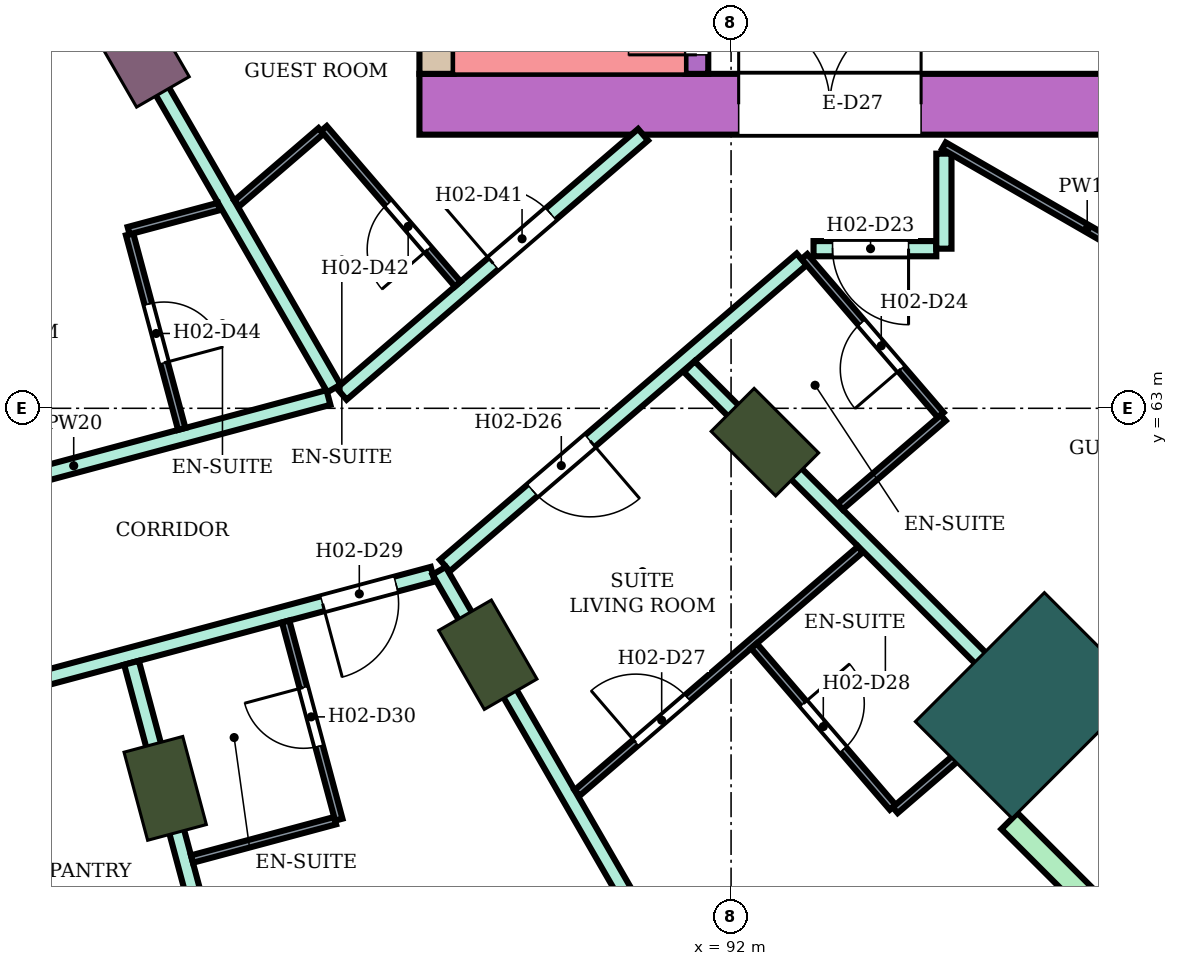
"""IFC4 building model, lengths in metres.
Left out: names, types, materials, properties, quantities, classifications, styles, units other than length and angle.
Written with IfcOpenShell. Run it as: python <this file> out.ifc"""

import sys

from ifc_helpers import new_model, si_unit, direction, frame, frame_2d, origin, origin_2d, place, context, subcontext, project, spatial, rectangle, extrude, element, fill, save


model = new_model("IFC4")
c1 = context("Model", 3, precision=1e-05, world=origin(), true_north=direction((0.0, 1.0)))
c2 = subcontext(c1, "Body", "Model", "MODEL_VIEW")
j1 = project(units=[si_unit("LENGTHUNIT", "METRE"), si_unit("PLANEANGLEUNIT", "RADIAN")], contexts=[c1])
p1 = place(None, origin())
s1 = spatial("IfcSite", under=j1, at=p1, CompositionType="ELEMENT")
p2 = place(p1, origin())
s2 = spatial("IfcBuilding", under=s1, at=p2, CompositionType="ELEMENT")
p3 = place(p2, frame((0.0, 0.0, 47.8)))
s3 = spatial("IfcBuildingStorey", under=s2, at=p3, CompositionType="ELEMENT", Elevation=47.8)
for number, where, z_axis, x_axis in (
    (1, (84.555, 58.0, 0.0), (0.0, 0.0, 1.0), (0.259, -0.966, 0.0)),
    (2, (88.8, 59.758, 0.0), (0.0, 0.0, 1.0), (0.5, -0.866, 0.0)),
    (3, (92.445, 62.555, 0.0), (0.0, 0.0, 1.0), (0.707, -0.707, 0.0)),
):
    element("IfcColumn", number, at=place(p3, frame(where, z_axis=z_axis, x_axis=x_axis)), inside=s3, PredefinedType="COLUMN", context=c2, shape_type="SweptSolid", body=[
        extrude(rectangle(XDim=1.2, YDim=0.8, at=origin_2d()), origin(), (0.0, 0.0, 1.0), 3.8),
    ])
p4 = place(p3, frame((84.3, 67.552, 0.0), z_axis=(0.0, 0.0, 1.0), x_axis=(0.5, -0.866025403784, 0.0)))
e4 = element("IfcColumn", 4, at=p4, inside=s3, PredefinedType="COLUMN", context=c2, shape_type="SweptSolid", body=[
    extrude(rectangle(XDim=0.9, YDim=0.8, at=origin_2d()), origin(), (0.0, 0.0, 1.0), 3.8),
])
p5 = place(p3, frame((95.91, 59.09, 0.0), z_axis=(0.0, 0.0, 1.0), x_axis=(0.707106781187, -0.707106781187, 0.0)))
e5 = element("IfcColumn", 5, at=p5, inside=s3, PredefinedType="COLUMN", context=c2, shape_type="SweptSolid", body=[
    extrude(rectangle(XDim=1.8, YDim=2.4, at=origin_2d()), origin(), (0.0, 0.0, 1.0), 3.8),
])
p6 = place(p3, frame((87.9, 67.0, 0.0), z_axis=(0.0, 0.0, 1.0), x_axis=(1.0, 0.0, 0.0)))
e6 = element("IfcWall", 6, at=p6, inside=s3, PredefinedType="SHEAR", context=c2, shape_type="SweptSolid", body=[
    extrude(rectangle(XDim=14.7, YDim=0.8, at=frame_2d((7.35, 0.0))), origin(), (0.0, 0.0, 1.0), 3.48),
])
p7 = place(p6, frame((4.2, 0.0, 0.0)))
e7 = element("IfcOpeningElement", 7, at=p7, cuts=e6, PredefinedType="OPENING", context=c2, shape_type="SweptSolid", body=[
    extrude(rectangle(XDim=2.4, YDim=2.4, at=frame_2d((1.2, 1.2))), frame((0.0, 0.41, 0.0), z_axis=(0.0, -1.0, 0.0), x_axis=(1.0, 0.0, 0.0)), (0.0, 0.0, 1.0), 0.82),
])
p8 = place(p3, frame((88.125, 67.4, 0.0), z_axis=(0.0, 0.0, 1.0), x_axis=(0.0, 1.0, 0.0)))
e8 = element("IfcWall", 8, at=p8, inside=s3, PredefinedType="SHEAR", context=c2, shape_type="SweptSolid", body=[
    extrude(rectangle(XDim=7.6, YDim=0.45, at=frame_2d((3.8, 0.0))), origin(), (0.0, 0.0, 1.0), 3.48),
])
p9 = place(p3, frame((91.55, 67.4, 0.0), z_axis=(0.0, 0.0, 1.0), x_axis=(0.0, 1.0, 0.0)))
e9 = element("IfcWall", 9, at=p9, inside=s3, PredefinedType="SHEAR", context=c2, shape_type="SweptSolid", body=[
    extrude(rectangle(XDim=7.6, YDim=0.3, at=frame_2d((3.8, 0.0))), origin(), (0.0, 0.0, 1.0), 3.48),
])
p10 = place(p9, frame((0.25, 0.0, 0.0)))
e10 = element("IfcOpeningElement", 10, at=p10, cuts=e9, PredefinedType="OPENING", context=c2, shape_type="SweptSolid", body=[
    extrude(rectangle(XDim=0.9, YDim=2.1, at=frame_2d((0.45, 1.05))), frame((0.0, 0.16, 0.0), z_axis=(0.0, -1.0, 0.0), x_axis=(1.0, 0.0, 0.0)), (0.0, 0.0, 1.0), 0.32),
])
p11 = place(p3, frame((95.662, 57.57, 0.0), z_axis=(0.0, 0.0, 1.0), x_axis=(0.707106781187, -0.707106781187, 0.0)))
e11 = element("IfcWall", 11, at=p11, inside=s3, PredefinedType="NOTDEFINED", context=c2, shape_type="SweptSolid", body=[
    extrude(rectangle(XDim=2.416, YDim=0.3, at=frame_2d((1.208, 0.0))), origin(), (0.0, 0.0, 1.0), 3.8),
])
p12 = place(p3, frame((80.0, 67.396, 0.0), z_axis=(0.0, 0.0, 1.0), x_axis=(0.965933654434, 0.258789828301, 0.0)))
e12 = element("IfcWall", 12, at=p12, inside=s3, PredefinedType="NOTDEFINED", context=c2, shape_type="SweptSolid", body=[
    extrude(rectangle(XDim=3.936, YDim=0.2, at=frame_2d((1.968, 0.0))), origin(), (0.0, 0.0, 1.0), 3.8),
])
p13 = place(p12, frame((0.468, 0.0, 0.9)))
e13 = element("IfcOpeningElement", 13, at=p13, cuts=e12, PredefinedType="OPENING", context=c2, shape_type="SweptSolid", body=[
    extrude(rectangle(XDim=3.0, YDim=2.3, at=frame_2d((1.5, 1.15))), frame((0.0, 0.11, 0.0), z_axis=(0.0, -1.0, 0.0), x_axis=(1.0, 0.0, 0.0)), (0.0, 0.0, 1.0), 0.22),
])
p14 = place(p3, frame((80.0, 58.655, 0.0), z_axis=(0.0, 0.0, 1.0), x_axis=(0.965967338894, 0.258664068224, 0.0)))
e14 = element("IfcWall", 14, at=p14, inside=s3, PredefinedType="PARTITIONING", context=c2, shape_type="SweptSolid", body=[
    extrude(rectangle(XDim=8.36, YDim=0.2, at=frame_2d((4.18, 0.0))), origin(), (0.0, 0.0, 1.0), 3.35),
])
p15 = place(p14, frame((6.86, 0.0, 0.0)))
e15 = element("IfcOpeningElement", 15, at=p15, cuts=e14, PredefinedType="OPENING", context=c2, shape_type="SweptSolid", body=[
    extrude(rectangle(XDim=1.0, YDim=2.1, at=frame_2d((0.5, 1.05))), frame((0.0, 0.11, 0.0), z_axis=(0.0, -1.0, 0.0), x_axis=(1.0, 0.0, 0.0)), (0.0, 0.0, 1.0), 0.22),
])
p16 = place(p14, frame((1.675, 0.0, 0.0)))
e16 = element("IfcOpeningElement", 16, at=p16, cuts=e14, PredefinedType="OPENING", context=c2, shape_type="SweptSolid", body=[
    extrude(rectangle(XDim=0.9, YDim=2.1, at=frame_2d((0.45, 1.05))), frame((0.0, 0.11, 0.0), z_axis=(0.0, -1.0, 0.0), x_axis=(1.0, 0.0, 0.0)), (0.0, 0.0, 1.0), 0.22),
])
p17 = place(p3, frame((80.0, 61.346, 0.0), z_axis=(0.0, 0.0, 1.0), x_axis=(0.965924181808, 0.258825182312, 0.0)))
e17 = element("IfcWall", 17, at=p17, inside=s3, PredefinedType="PARTITIONING", context=c2, shape_type="SweptSolid", body=[
    extrude(rectangle(XDim=6.94, YDim=0.2, at=frame_2d((3.47, 0.0))), origin(), (0.0, 0.0, 1.0), 3.35),
])
p18 = place(p17, frame((0.55, 0.0, 0.0)))
e18 = element("IfcOpeningElement", 18, at=p18, cuts=e17, PredefinedType="OPENING", context=c2, shape_type="SweptSolid", body=[
    extrude(rectangle(XDim=1.0, YDim=2.1, at=frame_2d((0.5, 1.05))), frame((0.0, 0.11, 0.0), z_axis=(0.0, -1.0, 0.0), x_axis=(1.0, 0.0, 0.0)), (0.0, 0.0, 1.0), 0.22),
])
p19 = place(p3, frame((83.848, 68.332, 0.0), z_axis=(0.0, 0.0, 1.0), x_axis=(0.499919778085, -0.866071714975, 0.0)))
e19 = element("IfcWall", 19, at=p19, inside=s3, PredefinedType="PARTITIONING", context=c2, shape_type="SweptSolid", body=[
    extrude(rectangle(XDim=5.855, YDim=0.2, at=frame_2d((2.927, 0.0))), origin(), (0.0, 0.0, 1.0), 3.35),
])
p20 = place(p3, frame((84.112, 59.652, 0.0), z_axis=(0.0, 0.0, 1.0), x_axis=(0.258791091927, -0.965933315886, 0.0)))
e20 = element("IfcWall", 20, at=p20, inside=s3, PredefinedType="PARTITIONING", context=c2, shape_type="SweptSolid", body=[
    extrude(rectangle(XDim=9.909, YDim=0.2, at=frame_2d((4.955, 0.0))), origin(), (0.0, 0.0, 1.0), 3.35),
])
p21 = place(p3, frame((86.877, 63.189, 0.0), z_axis=(0.0, 0.0, 1.0), x_axis=(0.758164888471, 0.652062881853, 0.0)))
e21 = element("IfcWall", 21, at=p21, inside=s3, PredefinedType="PARTITIONING", context=c2, shape_type="SweptSolid", body=[
    extrude(rectangle(XDim=5.23, YDim=0.2, at=frame_2d((2.615, 0.0))), origin(), (0.0, 0.0, 1.0), 3.35),
])
p22 = place(p21, frame((2.63, 0.0, 0.0)))
e22 = element("IfcOpeningElement", 22, at=p22, cuts=e21, PredefinedType="OPENING", context=c2, shape_type="SweptSolid", body=[
    extrude(rectangle(XDim=1.0, YDim=2.1, at=frame_2d((0.5, 1.05))), frame((0.0, 0.11, 0.0), z_axis=(0.0, -1.0, 0.0), x_axis=(1.0, 0.0, 0.0)), (0.0, 0.0, 1.0), 0.22),
])
p23 = place(p3, frame((88.235, 60.931, 0.0), z_axis=(0.0, 0.0, 1.0), x_axis=(0.758799498714, 0.651324282329, 0.0)))
e23 = element("IfcWall", 23, at=p23, inside=s3, PredefinedType="PARTITIONING", context=c2, shape_type="SweptSolid", body=[
    extrude(rectangle(XDim=6.186, YDim=0.2, at=frame_2d((3.093, 0.0))), origin(), (0.0, 0.0, 1.0), 3.35),
])
p24 = place(p23, frame((1.519, 0.0, 0.0)))
e24 = element("IfcOpeningElement", 24, at=p24, cuts=e23, PredefinedType="OPENING", context=c2, shape_type="SweptSolid", body=[
    extrude(rectangle(XDim=1.0, YDim=2.1, at=frame_2d((0.5, 1.05))), frame((0.0, 0.11, 0.0), z_axis=(0.0, -1.0, 0.0), x_axis=(1.0, 0.0, 0.0)), (0.0, 0.0, 1.0), 0.22),
])
p25 = place(p3, frame((88.159, 60.863, 0.0), z_axis=(0.0, 0.0, 1.0), x_axis=(0.499897184548, -0.866084756177, 0.0)))
e25 = element("IfcWall", 25, at=p25, inside=s3, PredefinedType="PARTITIONING", context=c2, shape_type="SweptSolid", body=[
    extrude(rectangle(XDim=9.475, YDim=0.2, at=frame_2d((4.737, 0.0))), origin(), (0.0, 0.0, 1.0), 3.35),
])
p26 = place(p3, frame((91.449, 63.548, 0.0), z_axis=(0.0, 0.0, 1.0), x_axis=(0.706984810649, -0.707228730688, 0.0)))
e26 = element("IfcWall", 26, at=p26, inside=s3, PredefinedType="PARTITIONING", context=c2, shape_type="SweptSolid", body=[
    extrude(rectangle(XDim=7.006, YDim=0.2, at=frame_2d((3.503, 0.0))), origin(), (0.0, 0.0, 1.0), 3.35),
])
p27 = place(p3, frame((93.085, 65.1, 0.0), z_axis=(0.0, 0.0, 1.0), x_axis=(1.0, 0.0, 0.0)))
e27 = element("IfcWall", 27, at=p27, inside=s3, PredefinedType="PARTITIONING", context=c2, shape_type="SweptSolid", body=[
    extrude(rectangle(XDim=1.615, YDim=0.2, at=frame_2d((0.808, 0.0))), origin(), (0.0, 0.0, 1.0), 3.35),
])
p28 = place(p27, frame((0.25, 0.0, 0.0)))
e28 = element("IfcOpeningElement", 28, at=p28, cuts=e27, PredefinedType="OPENING", context=c2, shape_type="SweptSolid", body=[
    extrude(rectangle(XDim=1.0, YDim=2.1, at=frame_2d((0.5, 1.05))), frame((0.0, 0.11, 0.0), z_axis=(0.0, -1.0, 0.0), x_axis=(1.0, 0.0, 0.0)), (0.0, 0.0, 1.0), 0.22),
])
p29 = place(p3, frame((94.8, 65.1, 0.0), z_axis=(0.0, 0.0, 1.0), x_axis=(0.0, 1.0, 0.0)))
e29 = element("IfcWall", 29, at=p29, inside=s3, PredefinedType="PARTITIONING", context=c2, shape_type="SweptSolid", body=[
    extrude(rectangle(XDim=1.25, YDim=0.2, at=frame_2d((0.625, 0.0))), origin(), (0.0, 0.0, 1.0), 3.35),
])
p30 = place(p3, frame((84.087, 65.289, 0.0), z_axis=(0.0, 0.0, 1.0), x_axis=(0.258929459649, -0.965896234037, 0.0)))
e30 = element("IfcWall", 30, at=p30, inside=s3, PredefinedType="PARTITIONING", context=c2, shape_type="SweptSolid", body=[
    extrude(rectangle(XDim=2.65, YDim=0.1, at=frame_2d((1.325, 0.0))), origin(), (0.0, 0.0, 1.0), 3.35),
])
p31 = place(p30, frame((0.95, 0.0, 0.0)))
e31 = element("IfcOpeningElement", 31, at=p31, cuts=e30, PredefinedType="OPENING", context=c2, shape_type="SweptSolid", body=[
    extrude(rectangle(XDim=0.8, YDim=2.1, at=frame_2d((0.4, 1.05))), frame((0.0, 0.06, 0.0), z_axis=(0.0, -1.0, 0.0), x_axis=(1.0, 0.0, 0.0)), (0.0, 0.0, 1.0), 0.12),
])
p32 = place(p3, frame((84.074, 65.337, 0.0), z_axis=(0.0, 0.0, 1.0), x_axis=(0.965914351064, 0.258861867428, 0.0)))
e32 = element("IfcWall", 32, at=p32, inside=s3, PredefinedType="PARTITIONING", context=c2, shape_type="SweptSolid", body=[
    extrude(rectangle(XDim=1.229, YDim=0.1, at=frame_2d((0.615, 0.0))), origin(), (0.0, 0.0, 1.0), 3.35),
])
p33 = place(p3, frame((84.908, 57.07, 0.0), z_axis=(0.0, 0.0, 1.0), x_axis=(0.965853538138, 0.25908867761, 0.0)))
e33 = element("IfcWall", 33, at=p33, inside=s3, PredefinedType="PARTITIONING", context=c2, shape_type="SweptSolid", body=[
    extrude(rectangle(XDim=1.95, YDim=0.1, at=frame_2d((0.975, 0.0))), origin(), (0.0, 0.0, 1.0), 3.35),
])
p34 = place(p3, frame((85.497, 65.696, 0.0), z_axis=(0.0, 0.0, 1.0), x_axis=(0.75817032582, 0.652056559698, 0.0)))
e34 = element("IfcWall", 34, at=p34, inside=s3, PredefinedType="PARTITIONING", context=c2, shape_type="SweptSolid", body=[
    extrude(rectangle(XDim=1.461, YDim=0.1, at=frame_2d((0.73, 0.0))), origin(), (0.0, 0.0, 1.0), 3.35),
])
p35 = place(p3, frame((86.14, 60.196, 0.0), z_axis=(0.0, 0.0, 1.0), x_axis=(0.258945475746, -0.965891940432, 0.0)))
e35 = element("IfcWall", 35, at=p35, inside=s3, PredefinedType="PARTITIONING", context=c2, shape_type="SweptSolid", body=[
    extrude(rectangle(XDim=2.7, YDim=0.1, at=frame_2d((1.35, 0.0))), origin(), (0.0, 0.0, 1.0), 3.35),
])
p36 = place(p35, frame((0.9, 0.0, 0.0)))
e36 = element("IfcOpeningElement", 36, at=p36, cuts=e35, PredefinedType="OPENING", context=c2, shape_type="SweptSolid", body=[
    extrude(rectangle(XDim=0.8, YDim=2.1, at=frame_2d((0.4, 1.05))), frame((0.0, 0.06, 0.0), z_axis=(0.0, -1.0, 0.0), x_axis=(1.0, 0.0, 0.0)), (0.0, 0.0, 1.0), 0.12),
])
p37 = place(p3, frame((86.643, 66.681, 0.0), z_axis=(0.0, 0.0, 1.0), x_axis=(0.652264876065, -0.757991115682, 0.0)))
e37 = element("IfcWall", 37, at=p37, inside=s3, PredefinedType="PARTITIONING", context=c2, shape_type="SweptSolid", body=[
    extrude(rectangle(XDim=2.699, YDim=0.1, at=frame_2d((1.35, 0.0))), origin(), (0.0, 0.0, 1.0), 3.35),
])
p38 = place(p37, frame((1.3, 0.0, 0.0)))
e38 = element("IfcOpeningElement", 38, at=p38, cuts=e37, PredefinedType="OPENING", context=c2, shape_type="SweptSolid", body=[
    extrude(rectangle(XDim=0.8, YDim=2.1, at=frame_2d((0.4, 1.05))), frame((0.0, 0.06, 0.0), z_axis=(0.0, -1.0, 0.0), x_axis=(1.0, 0.0, 0.0)), (0.0, 0.0, 1.0), 0.12),
])
p39 = place(p3, frame((89.974, 57.94, 0.0), z_axis=(0.0, 0.0, 1.0), x_axis=(0.75821417454, 0.652005571699, 0.0)))
e39 = element("IfcWall", 39, at=p39, inside=s3, PredefinedType="PARTITIONING", context=c2, shape_type="SweptSolid", body=[
    extrude(rectangle(XDim=4.915, YDim=0.1, at=frame_2d((2.457, 0.0))), origin(), (0.0, 0.0, 1.0), 3.35),
])
p40 = place(p39, frame((1.017, 0.0, 0.0)))
e40 = element("IfcOpeningElement", 40, at=p40, cuts=e39, PredefinedType="OPENING", context=c2, shape_type="SweptSolid", body=[
    extrude(rectangle(XDim=0.9, YDim=2.1, at=frame_2d((0.45, 1.05))), frame((0.0, 0.06, 0.0), z_axis=(0.0, -1.0, 0.0), x_axis=(1.0, 0.0, 0.0)), (0.0, 0.0, 1.0), 0.12),
])
p41 = place(p3, frame((92.301, 59.874, 0.0), z_axis=(0.0, 0.0, 1.0), x_axis=(0.652061320562, -0.758166231262, 0.0)))
e41 = element("IfcWall", 41, at=p41, inside=s3, PredefinedType="PARTITIONING", context=c2, shape_type="SweptSolid", body=[
    extrude(rectangle(XDim=2.8, YDim=0.1, at=frame_2d((1.4, 0.0))), origin(), (0.0, 0.0, 1.0), 3.35),
])
p42 = place(p41, frame((1.0, 0.0, 0.0)))
e42 = element("IfcOpeningElement", 42, at=p42, cuts=e41, PredefinedType="OPENING", context=c2, shape_type="SweptSolid", body=[
    extrude(rectangle(XDim=0.8, YDim=2.1, at=frame_2d((0.4, 1.05))), frame((0.0, 0.06, 0.0), z_axis=(0.0, -1.0, 0.0), x_axis=(1.0, 0.0, 0.0)), (0.0, 0.0, 1.0), 0.12),
])
p43 = place(p3, frame((92.965, 64.997, 0.0), z_axis=(0.0, 0.0, 1.0), x_axis=(0.652069888227, -0.758158862553, 0.0)))
e43 = element("IfcWall", 43, at=p43, inside=s3, PredefinedType="PARTITIONING", context=c2, shape_type="SweptSolid", body=[
    extrude(rectangle(XDim=2.75, YDim=0.1, at=frame_2d((1.375, 0.0))), origin(), (0.0, 0.0, 1.0), 3.35),
])
p44 = place(p43, frame((1.15, 0.0, 0.0)))
e44 = element("IfcOpeningElement", 44, at=p44, cuts=e43, PredefinedType="OPENING", context=c2, shape_type="SweptSolid", body=[
    extrude(rectangle(XDim=0.8, YDim=2.1, at=frame_2d((0.4, 1.05))), frame((0.0, 0.06, 0.0), z_axis=(0.0, -1.0, 0.0), x_axis=(1.0, 0.0, 0.0)), (0.0, 0.0, 1.0), 0.12),
])
p45 = place(p3, frame((93.435, 61.707, 0.0), z_axis=(0.0, 0.0, 1.0), x_axis=(0.758070495124, 0.652172618578, 0.0)))
e45 = element("IfcWall", 45, at=p45, inside=s3, PredefinedType="PARTITIONING", context=c2, shape_type="SweptSolid", body=[
    extrude(rectangle(XDim=1.789, YDim=0.1, at=frame_2d((0.895, 0.0))), origin(), (0.0, 0.0, 1.0), 3.35),
])
p46 = place(p3, frame((94.159, 57.713, 0.0), z_axis=(0.0, 0.0, 1.0), x_axis=(0.75802950812, 0.652220257903, 0.0)))
e46 = element("IfcWall", 46, at=p46, inside=s3, PredefinedType="PARTITIONING", context=c2, shape_type="SweptSolid", body=[
    extrude(rectangle(XDim=2.109, YDim=0.1, at=frame_2d((1.054, 0.0))), origin(), (0.0, 0.0, 1.0), 3.35),
])
p47 = place(p3, frame((94.8, 66.455, 0.0), z_axis=(0.0, 0.0, 1.0), x_axis=(0.86602264145, -0.500004784474, 0.0)))
e47 = element("IfcWall", 47, at=p47, inside=s3, PredefinedType="PARTITIONING", context=c2, shape_type="SweptSolid", body=[
    extrude(rectangle(XDim=8.708, YDim=0.1, at=frame_2d((4.354, 0.0))), origin(), (0.0, 0.0, 1.0), 3.35),
])
p48 = place(p47, frame((3.879, 0.0, 0.0)))
e48 = element("IfcOpeningElement", 48, at=p48, cuts=e47, PredefinedType="OPENING", context=c2, shape_type="SweptSolid", body=[
    extrude(rectangle(XDim=0.9, YDim=2.1, at=frame_2d((0.45, 1.05))), frame((0.0, 0.06, 0.0), z_axis=(0.0, -1.0, 0.0), x_axis=(1.0, 0.0, 0.0)), (0.0, 0.0, 1.0), 0.12),
])
p49 = place(p13, origin())
e49 = element("IfcWindow", 49, at=p49, inside=s3, PartitioningType="SINGLE_PANEL", PredefinedType="WINDOW", context=c2, shape_type="SweptSolid", body=[
    extrude(rectangle(XDim=3.0, YDim=2.3, at=frame_2d((1.5, 1.15))), frame((0.0, 0.03, 0.0), z_axis=(0.0, -1.0, 0.0), x_axis=(1.0, 0.0, 0.0)), (0.0, 0.0, 1.0), 0.06),
])
fill(e13, e49)
p50 = place(p28, frame((1.0, 0.0, 0.0), z_axis=(0.0, 0.0, 1.0), x_axis=(-1.0, 0.0, 0.0)))
e50 = element("IfcDoor", 50, at=p50, inside=s3, OperationType="SINGLE_SWING_LEFT", PredefinedType="DOOR", context=c2, shape_type="SweptSolid", body=[
    extrude(rectangle(XDim=1.0, YDim=2.1, at=frame_2d((0.5, 1.05))), frame((0.0, 0.025, 0.0), z_axis=(0.0, -1.0, 0.0), x_axis=(1.0, 0.0, 0.0)), (0.0, 0.0, 1.0), 0.05),
])
fill(e28, e50)
p51 = place(p44, frame((0.8, 0.0, 0.0), z_axis=(0.0, 0.0, 1.0), x_axis=(-1.0, 0.0, 0.0)))
e51 = element("IfcDoor", 51, at=p51, inside=s3, OperationType="SINGLE_SWING_LEFT", PredefinedType="DOOR", context=c2, shape_type="SweptSolid", body=[
    extrude(rectangle(XDim=0.8, YDim=2.1, at=frame_2d((0.4, 1.05))), frame((0.0, 0.025, 0.0), z_axis=(0.0, -1.0, 0.0), x_axis=(1.0, 0.0, 0.0)), (0.0, 0.0, 1.0), 0.05),
])
fill(e44, e51)
p52 = place(p24, frame((1.0, 0.0, 0.0), z_axis=(0.0, 0.0, 1.0), x_axis=(-1.0, 0.0, 0.0)))
e52 = element("IfcDoor", 52, at=p52, inside=s3, OperationType="SINGLE_SWING_LEFT", PredefinedType="DOOR", context=c2, shape_type="SweptSolid", body=[
    extrude(rectangle(XDim=1.0, YDim=2.1, at=frame_2d((0.5, 1.05))), frame((0.0, 0.025, 0.0), z_axis=(0.0, -1.0, 0.0), x_axis=(1.0, 0.0, 0.0)), (0.0, 0.0, 1.0), 0.05),
])
fill(e24, e52)
p53 = place(p40, origin())
e53 = element("IfcDoor", 53, at=p53, inside=s3, OperationType="SINGLE_SWING_LEFT", PredefinedType="DOOR", context=c2, shape_type="SweptSolid", body=[
    extrude(rectangle(XDim=0.9, YDim=2.1, at=frame_2d((0.45, 1.05))), frame((0.0, 0.025, 0.0), z_axis=(0.0, -1.0, 0.0), x_axis=(1.0, 0.0, 0.0)), (0.0, 0.0, 1.0), 0.05),
])
fill(e40, e53)
p54 = place(p42, origin())
e54 = element("IfcDoor", 54, at=p54, inside=s3, OperationType="SINGLE_SWING_LEFT", PredefinedType="DOOR", context=c2, shape_type="SweptSolid", body=[
    extrude(rectangle(XDim=0.8, YDim=2.1, at=frame_2d((0.4, 1.05))), frame((0.0, 0.025, 0.0), z_axis=(0.0, -1.0, 0.0), x_axis=(1.0, 0.0, 0.0)), (0.0, 0.0, 1.0), 0.05),
])
fill(e42, e54)
p55 = place(p15, frame((1.0, 0.0, 0.0), z_axis=(0.0, 0.0, 1.0), x_axis=(-1.0, 0.0, 0.0)))
e55 = element("IfcDoor", 55, at=p55, inside=s3, OperationType="SINGLE_SWING_RIGHT", PredefinedType="DOOR", context=c2, shape_type="SweptSolid", body=[
    extrude(rectangle(XDim=1.0, YDim=2.1, at=frame_2d((0.5, 1.05))), frame((0.0, 0.025, 0.0), z_axis=(0.0, -1.0, 0.0), x_axis=(1.0, 0.0, 0.0)), (0.0, 0.0, 1.0), 0.05),
])
fill(e15, e55)
p56 = place(p36, frame((0.8, 0.0, 0.0), z_axis=(0.0, 0.0, 1.0), x_axis=(-1.0, 0.0, 0.0)))
e56 = element("IfcDoor", 56, at=p56, inside=s3, OperationType="SINGLE_SWING_RIGHT", PredefinedType="DOOR", context=c2, shape_type="SweptSolid", body=[
    extrude(rectangle(XDim=0.8, YDim=2.1, at=frame_2d((0.4, 1.05))), frame((0.0, 0.025, 0.0), z_axis=(0.0, -1.0, 0.0), x_axis=(1.0, 0.0, 0.0)), (0.0, 0.0, 1.0), 0.05),
])
fill(e36, e56)
p57 = place(p22, origin())
e57 = element("IfcDoor", 57, at=p57, inside=s3, OperationType="SINGLE_SWING_LEFT", PredefinedType="DOOR", context=c2, shape_type="SweptSolid", body=[
    extrude(rectangle(XDim=1.0, YDim=2.1, at=frame_2d((0.5, 1.05))), frame((0.0, 0.025, 0.0), z_axis=(0.0, -1.0, 0.0), x_axis=(1.0, 0.0, 0.0)), (0.0, 0.0, 1.0), 0.05),
])
fill(e22, e57)
p58 = place(p38, frame((0.8, 0.0, 0.0), z_axis=(0.0, 0.0, 1.0), x_axis=(-1.0, 0.0, 0.0)))
e58 = element("IfcDoor", 58, at=p58, inside=s3, OperationType="SINGLE_SWING_LEFT", PredefinedType="DOOR", context=c2, shape_type="SweptSolid", body=[
    extrude(rectangle(XDim=0.8, YDim=2.1, at=frame_2d((0.4, 1.05))), frame((0.0, 0.025, 0.0), z_axis=(0.0, -1.0, 0.0), x_axis=(1.0, 0.0, 0.0)), (0.0, 0.0, 1.0), 0.05),
])
fill(e38, e58)
p59 = place(p31, origin())
e59 = element("IfcDoor", 59, at=p59, inside=s3, OperationType="SINGLE_SWING_RIGHT", PredefinedType="DOOR", context=c2, shape_type="SweptSolid", body=[
    extrude(rectangle(XDim=0.8, YDim=2.1, at=frame_2d((0.4, 1.05))), frame((0.0, 0.025, 0.0), z_axis=(0.0, -1.0, 0.0), x_axis=(1.0, 0.0, 0.0)), (0.0, 0.0, 1.0), 0.05),
])
fill(e31, e59)
p60 = place(p10, origin())
e60 = element("IfcDoor", 60, at=p60, inside=s3, OperationType="SINGLE_SWING_LEFT", PredefinedType="DOOR", context=c2, shape_type="SweptSolid", body=[
    extrude(rectangle(XDim=0.9, YDim=2.1, at=frame_2d((0.45, 1.05))), frame((0.0, 0.025, 0.0), z_axis=(0.0, -1.0, 0.0), x_axis=(1.0, 0.0, 0.0)), (0.0, 0.0, 1.0), 0.05),
])
fill(e10, e60)
p61 = place(p7, origin())
e61 = element("IfcDoor", 61, at=p61, inside=s3, OperationType="DOUBLE_DOOR_SINGLE_SWING", PredefinedType="DOOR", context=c2, shape_type="SweptSolid", body=[
    extrude(rectangle(XDim=2.4, YDim=2.4, at=frame_2d((1.2, 1.2))), frame((0.0, 0.025, 0.0), z_axis=(0.0, -1.0, 0.0), x_axis=(1.0, 0.0, 0.0)), (0.0, 0.0, 1.0), 0.05),
])
fill(e7, e61)
save(model, sys.argv[1])
